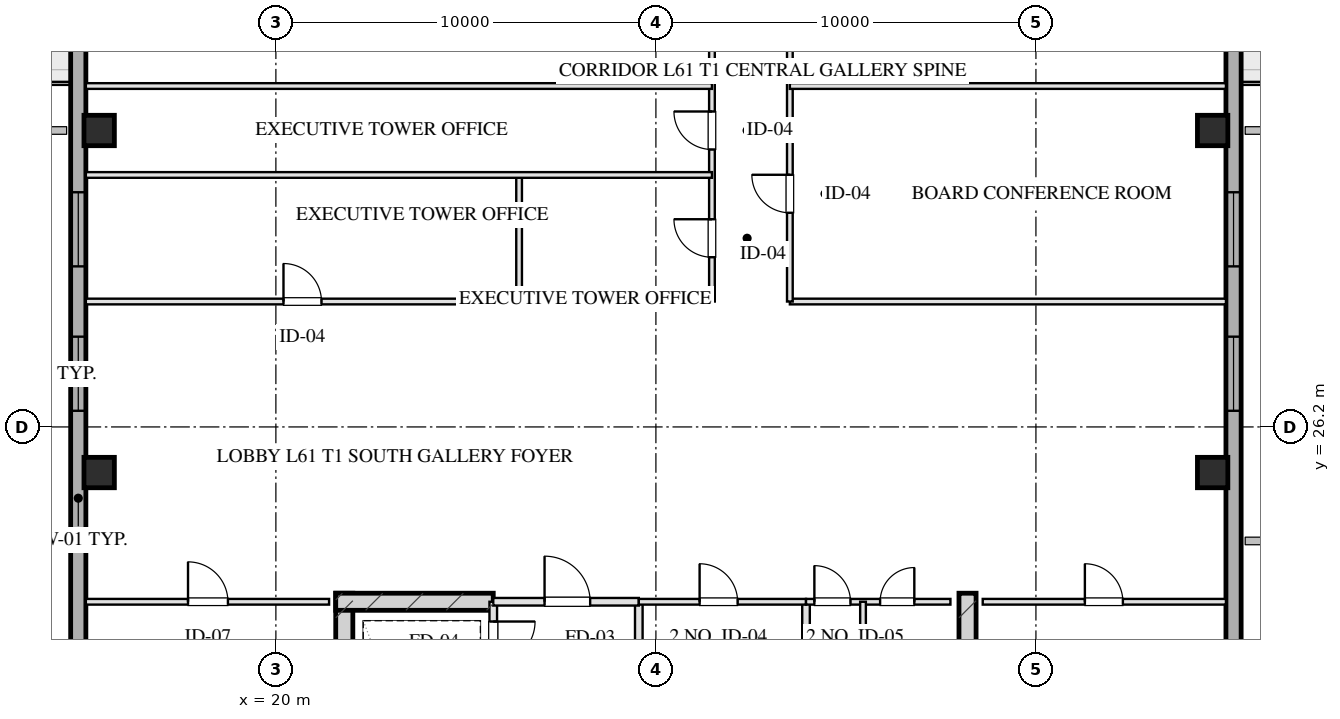
"""IFC4 building model, lengths in metres.
Left out: names, types, materials, properties, quantities, classifications, styles, units other than length and angle.
Written with IfcOpenShell. Run it as: python <this file> out.ifc"""

import sys

from ifc_helpers import new_model, si_unit, direction, frame, frame_2d, origin, origin_2d, place, context, subcontext, project, spatial, rectangle, hollow_rectangle, extrude, element, fill, save


model = new_model("IFC4")
c1 = context("Model", 3, precision=1e-05, world=origin(), true_north=direction((0.0, 1.0)))
c2 = subcontext(c1, "Body", "Model", "MODEL_VIEW")
j1 = project(units=[si_unit("LENGTHUNIT", "METRE"), si_unit("PLANEANGLEUNIT", "RADIAN")], contexts=[c1])
p1 = place(None, origin())
s1 = spatial("IfcSite", under=j1, at=p1, CompositionType="ELEMENT")
p2 = place(p1, origin())
s2 = spatial("IfcBuilding", under=s1, at=p2, CompositionType="ELEMENT")
p3 = place(p2, frame((0.0, 0.0, 226.55)))
s3 = spatial("IfcBuildingStorey", under=s2, at=p3, CompositionType="ELEMENT", Elevation=226.55)
for number, where, z_axis, x_axis in (
    (1, (21.8, 21.825, 0.0), (0.0, 0.0, 1.0), (0.0, -1.0, 0.0)),
    (2, (38.2, 21.825, 0.0), (0.0, 0.0, 1.0), (0.0, -1.0, 0.0)),
):
    element("IfcWall", number, at=place(p3, frame(where, z_axis=z_axis, x_axis=x_axis)), inside=s3, PredefinedType="SHEAR", context=c2, shape_type="SweptSolid", body=[
        extrude(rectangle(XDim=9.33, YDim=0.45, at=frame_2d((4.665, 0.0))), origin(), (0.0, 0.0, 1.0), 3.45),
    ])
p4 = place(p3, frame((21.575, 21.6, 0.0), z_axis=(0.0, 0.0, 1.0), x_axis=(1.0, 0.0, 0.0)))
e3 = element("IfcWall", 3, at=p4, inside=s3, PredefinedType="SHEAR", context=c2, shape_type="SweptSolid", body=[
    extrude(rectangle(XDim=4.145, YDim=0.45, at=frame_2d((2.073, 0.0))), origin(), (0.0, 0.0, 1.0), 3.45),
])
for number, where, z_axis, x_axis in (
    (4, (15.35, 25.0, 0.0), (0.0, 0.0, 1.0), (1.0, 0.0, 0.0)),
    (5, (15.35, 34.0, 0.0), (0.0, 0.0, 1.0), (1.0, 0.0, 0.0)),
    (6, (44.65, 25.0, 0.0), (0.0, 0.0, 1.0), (1.0, 0.0, 0.0)),
    (7, (44.65, 34.0, 0.0), (0.0, 0.0, 1.0), (1.0, 0.0, 0.0)),
):
    element("IfcColumn", number, at=place(p3, frame(where, z_axis=z_axis, x_axis=x_axis)), inside=s3, PredefinedType="COLUMN", context=c2, shape_type="SweptSolid", body=[
        extrude(hollow_rectangle(XDim=0.8, YDim=0.8, WallThickness=0.028, at=origin_2d()), origin(), (0.0, 0.0, 1.0), 3.451),
    ])
p5 = place(p3, frame((14.8, 13.1, 0.0), z_axis=(0.0, 0.0, 1.0), x_axis=(0.0, 1.0, 0.0)))
e8 = element("IfcWall", 8, at=p5, inside=s3, PredefinedType="SOLIDWALL", context=c2, shape_type="SweptSolid", body=[
    extrude(rectangle(XDim=41.8, YDim=0.4, at=frame_2d((20.9, 0.0))), origin(), (0.0, 0.0, 1.0), 2.55),
])
p6 = place(p5, frame((13.525, 0.0, 0.75)))
e9 = element("IfcOpeningElement", 9, at=p6, cuts=e8, PredefinedType="OPENING", context=c2, shape_type="SweptSolid", body=[
    extrude(rectangle(XDim=1.95, YDim=1.4, at=frame_2d((0.975, 0.7))), frame((0.0, 0.21, 0.0), z_axis=(0.0, -1.0, 0.0), x_axis=(1.0, 0.0, 0.0)), (0.0, 0.0, 1.0), 0.42),
])
p7 = place(p5, frame((17.325, 0.0, 0.75)))
e10 = element("IfcOpeningElement", 10, at=p7, cuts=e8, PredefinedType="OPENING", context=c2, shape_type="SweptSolid", body=[
    extrude(rectangle(XDim=1.95, YDim=1.4, at=frame_2d((0.975, 0.7))), frame((0.0, 0.21, 0.0), z_axis=(0.0, -1.0, 0.0), x_axis=(1.0, 0.0, 0.0)), (0.0, 0.0, 1.0), 0.42),
])
p8 = place(p5, frame((23.2, 0.0, 0.0)))
e11 = element("IfcOpeningElement", 11, at=p8, cuts=e8, PredefinedType="OPENING", context=c2, shape_type="SweptSolid", body=[
    extrude(rectangle(XDim=1.1, YDim=2.15, at=frame_2d((0.55, 1.075))), frame((0.0, 0.21, 0.0), z_axis=(0.0, -1.0, 0.0), x_axis=(1.0, 0.0, 0.0)), (0.0, 0.0, 1.0), 0.42),
])
p9 = place(p3, frame((45.2, 54.9, 0.0), z_axis=(0.0, 0.0, 1.0), x_axis=(0.0, -1.0, 0.0)))
e12 = element("IfcWall", 12, at=p9, inside=s3, PredefinedType="SOLIDWALL", context=c2, shape_type="SweptSolid", body=[
    extrude(rectangle(XDim=41.8, YDim=0.4, at=frame_2d((20.9, 0.0))), origin(), (0.0, 0.0, 1.0), 2.55),
])
p10 = place(p9, frame((26.325, 0.0, 0.75)))
e13 = element("IfcOpeningElement", 13, at=p10, cuts=e12, PredefinedType="OPENING", context=c2, shape_type="SweptSolid", body=[
    extrude(rectangle(XDim=1.95, YDim=1.4, at=frame_2d((0.975, 0.7))), frame((0.0, 0.21, 0.0), z_axis=(0.0, -1.0, 0.0), x_axis=(1.0, 0.0, 0.0)), (0.0, 0.0, 1.0), 0.42),
])
p11 = place(p9, frame((22.525, 0.0, 0.75)))
e14 = element("IfcOpeningElement", 14, at=p11, cuts=e12, PredefinedType="OPENING", context=c2, shape_type="SweptSolid", body=[
    extrude(rectangle(XDim=1.95, YDim=1.4, at=frame_2d((0.975, 0.7))), frame((0.0, 0.21, 0.0), z_axis=(0.0, -1.0, 0.0), x_axis=(1.0, 0.0, 0.0)), (0.0, 0.0, 1.0), 0.42),
])
p12 = place(p9, frame((17.5, 0.0, 0.0)))
e15 = element("IfcOpeningElement", 15, at=p12, cuts=e12, PredefinedType="OPENING", context=c2, shape_type="SweptSolid", body=[
    extrude(rectangle(XDim=1.1, YDim=2.15, at=frame_2d((0.55, 1.075))), frame((0.0, 0.21, 0.0), z_axis=(0.0, -1.0, 0.0), x_axis=(1.0, 0.0, 0.0)), (0.0, 0.0, 1.0), 0.42),
])
p13 = place(p3, frame((25.72, 21.6, 0.0), z_axis=(0.0, 0.0, 1.0), x_axis=(0.0, -1.0, 0.0)))
e16 = element("IfcWall", 16, at=p13, inside=s3, PredefinedType="PARTITIONING", context=c2, shape_type="SweptSolid", body=[
    extrude(rectangle(XDim=1.9, YDim=0.2, at=frame_2d((0.95, 0.0))), origin(), (0.0, 0.0, 1.0), 3.155),
])
p14 = place(p13, frame((0.52, 0.0, 0.0)))
e17 = element("IfcOpeningElement", 17, at=p14, cuts=e16, PredefinedType="OPENING", context=c2, shape_type="SweptSolid", body=[
    extrude(rectangle(XDim=1.1, YDim=2.05, at=frame_2d((0.55, 1.025))), frame((0.0, 0.11, 0.0), z_axis=(0.0, -1.0, 0.0), x_axis=(1.0, 0.0, 0.0)), (0.0, 0.0, 1.0), 0.22),
])
p15 = place(p3, frame((29.55, 21.6, 0.0), z_axis=(0.0, 0.0, 1.0), x_axis=(0.0, -1.0, 0.0)))
e18 = element("IfcWall", 18, at=p15, inside=s3, PredefinedType="PARTITIONING", context=c2, shape_type="SweptSolid", body=[
    extrude(rectangle(XDim=8.43, YDim=0.2, at=frame_2d((4.215, 0.0))), origin(), (0.0, 0.0, 1.0), 3.155),
])
p16 = place(p3, frame((25.72, 21.6, 0.0), z_axis=(0.0, 0.0, 1.0), x_axis=(1.0, 0.0, 0.0)))
e19 = element("IfcWall", 19, at=p16, inside=s3, PredefinedType="PARTITIONING", context=c2, shape_type="SweptSolid", body=[
    extrude(rectangle(XDim=3.83, YDim=0.2, at=frame_2d((1.915, 0.0))), origin(), (0.0, 0.0, 1.0), 3.155),
])
p17 = place(p16, frame((1.35, 0.0, 0.0)))
e20 = element("IfcOpeningElement", 20, at=p17, cuts=e19, PredefinedType="OPENING", context=c2, shape_type="SweptSolid", body=[
    extrude(rectangle(XDim=1.2, YDim=2.05, at=frame_2d((0.6, 1.025))), frame((0.0, 0.11, 0.0), z_axis=(0.0, -1.0, 0.0), x_axis=(1.0, 0.0, 0.0)), (0.0, 0.0, 1.0), 0.22),
])
p18 = place(p3, frame((33.95, 21.6, 0.0), z_axis=(0.0, 0.0, 1.0), x_axis=(0.0, -1.0, 0.0)))
e21 = element("IfcWall", 21, at=p18, inside=s3, PredefinedType="PARTITIONING", context=c2, shape_type="SweptSolid", body=[
    extrude(rectangle(XDim=8.43, YDim=0.2, at=frame_2d((4.215, 0.0))), origin(), (0.0, 0.0, 1.0), 3.155),
])
p19 = place(p3, frame((29.55, 21.6, 0.0), z_axis=(0.0, 0.0, 1.0), x_axis=(1.0, 0.0, 0.0)))
e22 = element("IfcWall", 22, at=p19, inside=s3, PredefinedType="PARTITIONING", context=c2, shape_type="SweptSolid", body=[
    extrude(rectangle(XDim=4.4, YDim=0.15, at=frame_2d((2.2, 0.0))), origin(), (0.0, 0.0, 1.0), 3.155),
])
p20 = place(p19, frame((1.6, 0.0, 0.0)))
e23 = element("IfcOpeningElement", 23, at=p20, cuts=e22, PredefinedType="OPENING", context=c2, shape_type="SweptSolid", body=[
    extrude(rectangle(XDim=1.0, YDim=2.05, at=frame_2d((0.5, 1.025))), frame((0.0, 0.085, 0.0), z_axis=(0.0, -1.0, 0.0), x_axis=(1.0, 0.0, 0.0)), (0.0, 0.0, 1.0), 0.17),
])
p21 = place(p3, frame((33.95, 21.6, 0.0), z_axis=(0.0, 0.0, 1.0), x_axis=(1.0, 0.0, 0.0)))
e24 = element("IfcWall", 24, at=p21, inside=s3, PredefinedType="PARTITIONING", context=c2, shape_type="SweptSolid", body=[
    extrude(rectangle(XDim=3.8, YDim=0.15, at=frame_2d((1.9, 0.0))), origin(), (0.0, 0.0, 1.0), 3.155),
])
p22 = place(p21, frame((0.22, 0.0, 0.0)))
e25 = element("IfcOpeningElement", 25, at=p22, cuts=e24, PredefinedType="OPENING", context=c2, shape_type="SweptSolid", body=[
    extrude(rectangle(XDim=0.95, YDim=2.05, at=frame_2d((0.475, 1.025))), frame((0.0, 0.085, 0.0), z_axis=(0.0, -1.0, 0.0), x_axis=(1.0, 0.0, 0.0)), (0.0, 0.0, 1.0), 0.17),
])
p23 = place(p21, frame((1.95, 0.0, 0.0)))
e26 = element("IfcOpeningElement", 26, at=p23, cuts=e24, PredefinedType="OPENING", context=c2, shape_type="SweptSolid", body=[
    extrude(rectangle(XDim=0.9, YDim=2.05, at=frame_2d((0.45, 1.025))), frame((0.0, 0.085, 0.0), z_axis=(0.0, -1.0, 0.0), x_axis=(1.0, 0.0, 0.0)), (0.0, 0.0, 1.0), 0.17),
])
p24 = place(p3, frame((35.45, 21.6, 0.0), z_axis=(0.0, 0.0, 1.0), x_axis=(0.0, -1.0, 0.0)))
e27 = element("IfcWall", 27, at=p24, inside=s3, PredefinedType="PARTITIONING", context=c2, shape_type="SweptSolid", body=[
    extrude(rectangle(XDim=8.43, YDim=0.15, at=frame_2d((4.215, 0.0))), origin(), (0.0, 0.0, 1.0), 2.795),
])
p25 = place(p24, frame((2.55, 0.0, 0.0)))
e28 = element("IfcOpeningElement", 28, at=p25, cuts=e27, PredefinedType="OPENING", context=c2, shape_type="SweptSolid", body=[
    extrude(rectangle(XDim=0.95, YDim=2.05, at=frame_2d((0.475, 1.025))), frame((0.0, 0.085, 0.0), z_axis=(0.0, -1.0, 0.0), x_axis=(1.0, 0.0, 0.0)), (0.0, 0.0, 1.0), 0.17),
])
p26 = place(p24, frame((5.6, 0.0, 0.0)))
e29 = element("IfcOpeningElement", 29, at=p26, cuts=e27, PredefinedType="OPENING", context=c2, shape_type="SweptSolid", body=[
    extrude(rectangle(XDim=0.9, YDim=2.05, at=frame_2d((0.45, 1.025))), frame((0.0, 0.085, 0.0), z_axis=(0.0, -1.0, 0.0), x_axis=(1.0, 0.0, 0.0)), (0.0, 0.0, 1.0), 0.17),
])
p27 = place(p3, frame((15.0, 21.6, 0.0), z_axis=(0.0, 0.0, 1.0), x_axis=(1.0, 0.0, 0.0)))
e30 = element("IfcWall", 30, at=p27, inside=s3, PredefinedType="PARTITIONING", context=c2, shape_type="SweptSolid", body=[
    extrude(rectangle(XDim=6.4, YDim=0.15, at=frame_2d((3.2, 0.0))), origin(), (0.0, 0.0, 1.0), 3.155),
])
p28 = place(p27, frame((2.688, 0.0, 0.0)))
e31 = element("IfcOpeningElement", 31, at=p28, cuts=e30, PredefinedType="OPENING", context=c2, shape_type="SweptSolid", body=[
    extrude(rectangle(XDim=1.05, YDim=2.05, at=frame_2d((0.525, 1.025))), frame((0.0, 0.085, 0.0), z_axis=(0.0, -1.0, 0.0), x_axis=(1.0, 0.0, 0.0)), (0.0, 0.0, 1.0), 0.17),
])
p29 = place(p3, frame((38.6, 21.6, 0.0), z_axis=(0.0, 0.0, 1.0), x_axis=(1.0, 0.0, 0.0)))
e32 = element("IfcWall", 32, at=p29, inside=s3, PredefinedType="PARTITIONING", context=c2, shape_type="SweptSolid", body=[
    extrude(rectangle(XDim=6.4, YDim=0.15, at=frame_2d((3.2, 0.0))), origin(), (0.0, 0.0, 1.0), 3.155),
])
p30 = place(p29, frame((2.688, 0.0, 0.0)))
e33 = element("IfcOpeningElement", 33, at=p30, cuts=e32, PredefinedType="OPENING", context=c2, shape_type="SweptSolid", body=[
    extrude(rectangle(XDim=1.0, YDim=2.05, at=frame_2d((0.5, 1.025))), frame((0.0, 0.085, 0.0), z_axis=(0.0, -1.0, 0.0), x_axis=(1.0, 0.0, 0.0)), (0.0, 0.0, 1.0), 0.17),
])
p31 = place(p3, frame((15.0, 29.5, 0.0), z_axis=(0.0, 0.0, 1.0), x_axis=(1.0, 0.0, 0.0)))
e34 = element("IfcWall", 34, at=p31, inside=s3, PredefinedType="PARTITIONING", context=c2, shape_type="SweptSolid", body=[
    extrude(rectangle(XDim=16.475, YDim=0.15, at=frame_2d((8.238, 0.0))), origin(), (0.0, 0.0, 1.0), 3.155),
])
p32 = place(p31, frame((5.2, 0.0, 0.0)))
e35 = element("IfcOpeningElement", 35, at=p32, cuts=e34, PredefinedType="OPENING", context=c2, shape_type="SweptSolid", body=[
    extrude(rectangle(XDim=1.0, YDim=2.05, at=frame_2d((0.5, 1.025))), frame((0.0, 0.085, 0.0), z_axis=(0.0, -1.0, 0.0), x_axis=(1.0, 0.0, 0.0)), (0.0, 0.0, 1.0), 0.17),
])
p33 = place(p3, frame((33.525, 29.5, 0.0), z_axis=(0.0, 0.0, 1.0), x_axis=(1.0, 0.0, 0.0)))
e36 = element("IfcWall", 36, at=p33, inside=s3, PredefinedType="PARTITIONING", context=c2, shape_type="SweptSolid", body=[
    extrude(rectangle(XDim=11.475, YDim=0.15, at=frame_2d((5.738, 0.0))), origin(), (0.0, 0.0, 1.0), 3.155),
])
p34 = place(p3, frame((31.475, 29.5, 0.0), z_axis=(0.0, 0.0, 1.0), x_axis=(0.0, 1.0, 0.0)))
e37 = element("IfcWall", 37, at=p34, inside=s3, PredefinedType="PARTITIONING", context=c2, shape_type="SweptSolid", body=[
    extrude(rectangle(XDim=9.0, YDim=0.15, at=frame_2d((4.5, 0.0))), origin(), (0.0, 0.0, 1.0), 3.155),
])
p35 = place(p34, frame((1.165, 0.0, 0.0)))
e38 = element("IfcOpeningElement", 38, at=p35, cuts=e37, PredefinedType="OPENING", context=c2, shape_type="SweptSolid", body=[
    extrude(rectangle(XDim=1.0, YDim=2.05, at=frame_2d((0.5, 1.025))), frame((0.0, 0.085, 0.0), z_axis=(0.0, -1.0, 0.0), x_axis=(1.0, 0.0, 0.0)), (0.0, 0.0, 1.0), 0.17),
])
p36 = place(p34, frame((4.0, 0.0, 0.0)))
e39 = element("IfcOpeningElement", 39, at=p36, cuts=e37, PredefinedType="OPENING", context=c2, shape_type="SweptSolid", body=[
    extrude(rectangle(XDim=1.0, YDim=2.05, at=frame_2d((0.5, 1.025))), frame((0.0, 0.085, 0.0), z_axis=(0.0, -1.0, 0.0), x_axis=(1.0, 0.0, 0.0)), (0.0, 0.0, 1.0), 0.17),
])
p37 = place(p34, frame((6.835, 0.0, 0.0)))
e40 = element("IfcOpeningElement", 40, at=p37, cuts=e37, PredefinedType="OPENING", context=c2, shape_type="SweptSolid", body=[
    extrude(rectangle(XDim=1.05, YDim=2.05, at=frame_2d((0.525, 1.025))), frame((0.0, 0.085, 0.0), z_axis=(0.0, -1.0, 0.0), x_axis=(1.0, 0.0, 0.0)), (0.0, 0.0, 1.0), 0.17),
])
p38 = place(p3, frame((33.525, 29.5, 0.0), z_axis=(0.0, 0.0, 1.0), x_axis=(0.0, 1.0, 0.0)))
e41 = element("IfcWall", 41, at=p38, inside=s3, PredefinedType="PARTITIONING", context=c2, shape_type="SweptSolid", body=[
    extrude(rectangle(XDim=9.0, YDim=0.15, at=frame_2d((4.5, 0.0))), origin(), (0.0, 0.0, 1.0), 3.155),
])
p39 = place(p38, frame((2.335, 0.0, 0.0)))
e42 = element("IfcOpeningElement", 42, at=p39, cuts=e41, PredefinedType="OPENING", context=c2, shape_type="SweptSolid", body=[
    extrude(rectangle(XDim=1.0, YDim=2.05, at=frame_2d((0.5, 1.025))), frame((0.0, 0.085, 0.0), z_axis=(0.0, -1.0, 0.0), x_axis=(1.0, 0.0, 0.0)), (0.0, 0.0, 1.0), 0.17),
])
p40 = place(p38, frame((6.835, 0.0, 0.0)))
e43 = element("IfcOpeningElement", 43, at=p40, cuts=e41, PredefinedType="OPENING", context=c2, shape_type="SweptSolid", body=[
    extrude(rectangle(XDim=1.0, YDim=2.05, at=frame_2d((0.5, 1.025))), frame((0.0, 0.085, 0.0), z_axis=(0.0, -1.0, 0.0), x_axis=(1.0, 0.0, 0.0)), (0.0, 0.0, 1.0), 0.17),
])
p41 = place(p3, frame((26.4, 29.5, 0.0), z_axis=(0.0, 0.0, 1.0), x_axis=(0.0, 1.0, 0.0)))
e44 = element("IfcWall", 44, at=p41, inside=s3, PredefinedType="PARTITIONING", context=c2, shape_type="SweptSolid", body=[
    extrude(rectangle(XDim=3.33, YDim=0.15, at=frame_2d((1.665, 0.0))), origin(), (0.0, 0.0, 1.0), 3.155),
])
for number, where, z_axis, x_axis in (
    (45, (15.0, 32.83, 0.0), (0.0, 0.0, 1.0), (1.0, 0.0, 0.0)),
    (46, (15.0, 35.17, 0.0), (0.0, 0.0, 1.0), (1.0, 0.0, 0.0)),
):
    element("IfcWall", number, at=place(p3, frame(where, z_axis=z_axis, x_axis=x_axis)), inside=s3, PredefinedType="PARTITIONING", context=c2, shape_type="SweptSolid", body=[
        extrude(rectangle(XDim=16.475, YDim=0.15, at=frame_2d((8.238, 0.0))), origin(), (0.0, 0.0, 1.0), 3.155),
    ])
p42 = place(p3, frame((33.525, 35.17, 0.0), z_axis=(0.0, 0.0, 1.0), x_axis=(1.0, 0.0, 0.0)))
e47 = element("IfcWall", 47, at=p42, inside=s3, PredefinedType="PARTITIONING", context=c2, shape_type="SweptSolid", body=[
    extrude(rectangle(XDim=11.475, YDim=0.15, at=frame_2d((5.738, 0.0))), origin(), (0.0, 0.0, 1.0), 3.155),
])
p43 = place(p6, origin())
e48 = element("IfcWindow", 48, at=p43, inside=s3, PartitioningType="TRIPLE_PANEL_VERTICAL", PredefinedType="WINDOW", context=c2, shape_type="SweptSolid", body=[
    extrude(rectangle(XDim=1.95, YDim=1.4, at=frame_2d((0.975, 0.7))), frame((0.0, 0.03, 0.0), z_axis=(0.0, -1.0, 0.0), x_axis=(1.0, 0.0, 0.0)), (0.0, 0.0, 1.0), 0.06),
])
fill(e9, e48)
p44 = place(p7, origin())
e49 = element("IfcWindow", 49, at=p44, inside=s3, PartitioningType="TRIPLE_PANEL_VERTICAL", PredefinedType="WINDOW", context=c2, shape_type="SweptSolid", body=[
    extrude(rectangle(XDim=1.95, YDim=1.4, at=frame_2d((0.975, 0.7))), frame((0.0, 0.03, 0.0), z_axis=(0.0, -1.0, 0.0), x_axis=(1.0, 0.0, 0.0)), (0.0, 0.0, 1.0), 0.06),
])
fill(e10, e49)
p45 = place(p10, origin())
e50 = element("IfcWindow", 50, at=p45, inside=s3, PartitioningType="TRIPLE_PANEL_VERTICAL", PredefinedType="WINDOW", context=c2, shape_type="SweptSolid", body=[
    extrude(rectangle(XDim=1.95, YDim=1.4, at=frame_2d((0.975, 0.7))), frame((0.0, 0.03, 0.0), z_axis=(0.0, -1.0, 0.0), x_axis=(1.0, 0.0, 0.0)), (0.0, 0.0, 1.0), 0.06),
])
fill(e13, e50)
p46 = place(p11, origin())
e51 = element("IfcWindow", 51, at=p46, inside=s3, PartitioningType="TRIPLE_PANEL_VERTICAL", PredefinedType="WINDOW", context=c2, shape_type="SweptSolid", body=[
    extrude(rectangle(XDim=1.95, YDim=1.4, at=frame_2d((0.975, 0.7))), frame((0.0, 0.03, 0.0), z_axis=(0.0, -1.0, 0.0), x_axis=(1.0, 0.0, 0.0)), (0.0, 0.0, 1.0), 0.06),
])
fill(e14, e51)
p47 = place(p14, origin())
e52 = element("IfcDoor", 52, at=p47, inside=s3, OperationType="SINGLE_SWING_LEFT", PredefinedType="DOOR", context=c2, shape_type="SweptSolid", body=[
    extrude(rectangle(XDim=1.1, YDim=2.05, at=frame_2d((0.55, 1.025))), frame((0.0, 0.025, 0.0), z_axis=(0.0, -1.0, 0.0), x_axis=(1.0, 0.0, 0.0)), (0.0, 0.0, 1.0), 0.05),
])
fill(e17, e52)
p48 = place(p17, origin())
e53 = element("IfcDoor", 53, at=p48, inside=s3, OperationType="SINGLE_SWING_LEFT", PredefinedType="DOOR", context=c2, shape_type="SweptSolid", body=[
    extrude(rectangle(XDim=1.2, YDim=2.05, at=frame_2d((0.6, 1.025))), frame((0.0, 0.025, 0.0), z_axis=(0.0, -1.0, 0.0), x_axis=(1.0, 0.0, 0.0)), (0.0, 0.0, 1.0), 0.05),
])
fill(e20, e53)
p49 = place(p20, origin())
e54 = element("IfcDoor", 54, at=p49, inside=s3, OperationType="SINGLE_SWING_LEFT", PredefinedType="DOOR", context=c2, shape_type="SweptSolid", body=[
    extrude(rectangle(XDim=1.0, YDim=2.05, at=frame_2d((0.5, 1.025))), frame((0.0, 0.025, 0.0), z_axis=(0.0, -1.0, 0.0), x_axis=(1.0, 0.0, 0.0)), (0.0, 0.0, 1.0), 0.05),
])
fill(e23, e54)
p50 = place(p22, origin())
e55 = element("IfcDoor", 55, at=p50, inside=s3, OperationType="SINGLE_SWING_LEFT", PredefinedType="DOOR", context=c2, shape_type="SweptSolid", body=[
    extrude(rectangle(XDim=0.95, YDim=2.05, at=frame_2d((0.475, 1.025))), frame((0.0, 0.025, 0.0), z_axis=(0.0, -1.0, 0.0), x_axis=(1.0, 0.0, 0.0)), (0.0, 0.0, 1.0), 0.05),
])
fill(e25, e55)
p51 = place(p23, origin())
e56 = element("IfcDoor", 56, at=p51, inside=s3, OperationType="SINGLE_SWING_RIGHT", PredefinedType="DOOR", context=c2, shape_type="SweptSolid", body=[
    extrude(rectangle(XDim=0.9, YDim=2.05, at=frame_2d((0.45, 1.025))), frame((0.0, 0.025, 0.0), z_axis=(0.0, -1.0, 0.0), x_axis=(1.0, 0.0, 0.0)), (0.0, 0.0, 1.0), 0.05),
])
fill(e26, e56)
p52 = place(p28, origin())
e57 = element("IfcDoor", 57, at=p52, inside=s3, OperationType="SINGLE_SWING_LEFT", PredefinedType="DOOR", context=c2, shape_type="SweptSolid", body=[
    extrude(rectangle(XDim=1.05, YDim=2.05, at=frame_2d((0.525, 1.025))), frame((0.0, 0.025, 0.0), z_axis=(0.0, -1.0, 0.0), x_axis=(1.0, 0.0, 0.0)), (0.0, 0.0, 1.0), 0.05),
])
fill(e31, e57)
p53 = place(p30, origin())
e58 = element("IfcDoor", 58, at=p53, inside=s3, OperationType="SINGLE_SWING_LEFT", PredefinedType="DOOR", context=c2, shape_type="SweptSolid", body=[
    extrude(rectangle(XDim=1.0, YDim=2.05, at=frame_2d((0.5, 1.025))), frame((0.0, 0.025, 0.0), z_axis=(0.0, -1.0, 0.0), x_axis=(1.0, 0.0, 0.0)), (0.0, 0.0, 1.0), 0.05),
])
fill(e33, e58)
p54 = place(p32, origin())
e59 = element("IfcDoor", 59, at=p54, inside=s3, OperationType="SINGLE_SWING_LEFT", PredefinedType="DOOR", context=c2, shape_type="SweptSolid", body=[
    extrude(rectangle(XDim=1.0, YDim=2.05, at=frame_2d((0.5, 1.025))), frame((0.0, 0.025, 0.0), z_axis=(0.0, -1.0, 0.0), x_axis=(1.0, 0.0, 0.0)), (0.0, 0.0, 1.0), 0.05),
])
fill(e35, e59)
p55 = place(p35, origin())
e60 = element("IfcDoor", 60, at=p55, inside=s3, OperationType="SINGLE_SWING_RIGHT", PredefinedType="DOOR", context=c2, shape_type="SweptSolid", body=[
    extrude(rectangle(XDim=1.0, YDim=2.05, at=frame_2d((0.5, 1.025))), frame((0.0, 0.025, 0.0), z_axis=(0.0, -1.0, 0.0), x_axis=(1.0, 0.0, 0.0)), (0.0, 0.0, 1.0), 0.05),
])
fill(e38, e60)
p56 = place(p36, origin())
e61 = element("IfcDoor", 61, at=p56, inside=s3, OperationType="SINGLE_SWING_RIGHT", PredefinedType="DOOR", context=c2, shape_type="SweptSolid", body=[
    extrude(rectangle(XDim=1.0, YDim=2.05, at=frame_2d((0.5, 1.025))), frame((0.0, 0.025, 0.0), z_axis=(0.0, -1.0, 0.0), x_axis=(1.0, 0.0, 0.0)), (0.0, 0.0, 1.0), 0.05),
])
fill(e39, e61)
p57 = place(p39, origin())
e62 = element("IfcDoor", 62, at=p57, inside=s3, OperationType="SINGLE_SWING_RIGHT", PredefinedType="DOOR", context=c2, shape_type="SweptSolid", body=[
    extrude(rectangle(XDim=1.0, YDim=2.05, at=frame_2d((0.5, 1.025))), frame((0.0, 0.025, 0.0), z_axis=(0.0, -1.0, 0.0), x_axis=(1.0, 0.0, 0.0)), (0.0, 0.0, 1.0), 0.05),
])
fill(e42, e62)
save(model, sys.argv[1])
